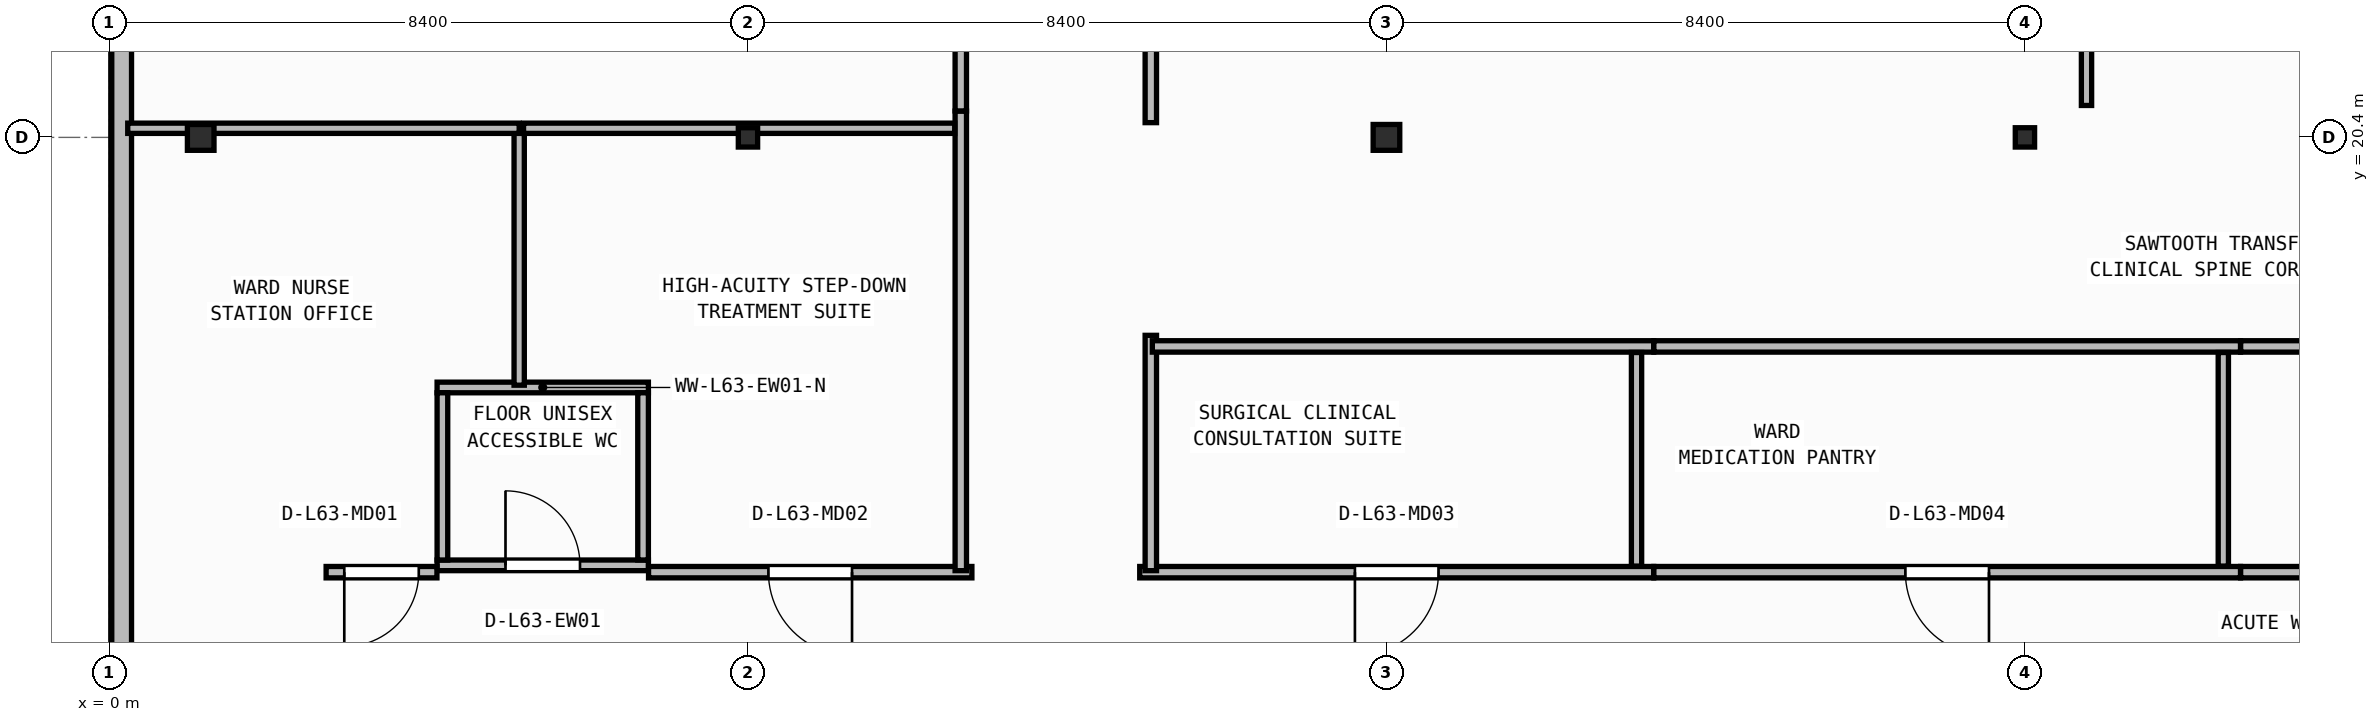
"""IFC4 building model, lengths in metres.
Left out: names, types, materials, properties, quantities, classifications, styles, units other than length and angle.
Written with IfcOpenShell. Run it as: python <this file> out.ifc"""

import sys

from ifc_helpers import new_model, si_unit, direction, frame, frame_2d, origin, origin_2d, place, context, subcontext, project, spatial, rectangle, i_section, extrude, element, fill, save


model = new_model("IFC4")
c1 = context("Model", 3, precision=1e-05, world=origin(), true_north=direction((0.0, 1.0)))
c2 = subcontext(c1, "Body", "Model", "MODEL_VIEW")
j1 = project(units=[si_unit("LENGTHUNIT", "METRE"), si_unit("PLANEANGLEUNIT", "RADIAN")], contexts=[c1])
p1 = place(None, origin())
s1 = spatial("IfcSite", under=j1, at=p1, CompositionType="ELEMENT")
p2 = place(p1, origin())
s2 = spatial("IfcBuilding", under=s1, at=p2, CompositionType="ELEMENT")
p3 = place(p2, frame((0.0, 0.0, 256.55)))
s3 = spatial("IfcBuildingStorey", under=s2, at=p3, CompositionType="ELEMENT", Elevation=256.55)
p4 = place(p3, frame((1.2, 20.4, 0.0), z_axis=(0.0, 0.0, 1.0), x_axis=(1.0, 0.0, 0.0)))
e1 = element("IfcColumn", 1, at=p4, inside=s3, PredefinedType="COLUMN", context=c2, shape_type="SweptSolid", body=[
    extrude(i_section(OverallWidth=0.35, OverallDepth=0.34, WebThickness=0.016, FlangeThickness=0.028, at=origin_2d()), origin(), (0.0, 0.0, 1.0), 3.95),
])
p5 = place(p3, frame((8.4, 20.4, 0.0), z_axis=(0.0, 0.0, 1.0), x_axis=(1.0, 0.0, 0.0)))
e2 = element("IfcColumn", 2, at=p5, inside=s3, PredefinedType="COLUMN", context=c2, shape_type="SweptSolid", body=[
    extrude(i_section(OverallWidth=0.254, OverallDepth=0.254, WebThickness=0.009, FlangeThickness=0.014, FilletRadius=0.013, at=origin_2d()), origin(), (0.0, 0.0, 1.0), 3.95),
])
p6 = place(p3, frame((16.8, 20.4, 0.0), z_axis=(0.0, 0.0, 1.0), x_axis=(1.0, 0.0, 0.0)))
e3 = element("IfcColumn", 3, at=p6, inside=s3, PredefinedType="COLUMN", context=c2, shape_type="SweptSolid", body=[
    extrude(i_section(OverallWidth=0.35, OverallDepth=0.34, WebThickness=0.016, FlangeThickness=0.028, at=origin_2d()), origin(), (0.0, 0.0, 1.0), 3.95),
])
p7 = place(p3, frame((25.2, 20.4, 0.0), z_axis=(0.0, 0.0, 1.0), x_axis=(1.0, 0.0, 0.0)))
e4 = element("IfcColumn", 4, at=p7, inside=s3, PredefinedType="COLUMN", context=c2, shape_type="SweptSolid", body=[
    extrude(i_section(OverallWidth=0.254, OverallDepth=0.254, WebThickness=0.009, FlangeThickness=0.014, FilletRadius=0.013, at=origin_2d()), origin(), (0.0, 0.0, 1.0), 3.95),
])
p8 = place(p3, frame((0.16, 39.04, 0.0), z_axis=(0.0, 0.0, 1.0), x_axis=(0.0, -1.0, 0.0)))
e5 = element("IfcWall", 5, at=p8, inside=s3, PredefinedType="STANDARD", context=c2, shape_type="SweptSolid", body=[
    extrude(rectangle(XDim=36.48, YDim=0.26, at=frame_2d((18.24, 0.0))), origin(), (0.0, 0.0, 1.0), 3.71),
])
p9 = place(p8, frame((26.31, 0.0, 0.9)))
e6 = element("IfcOpeningElement", 6, at=p9, cuts=e5, PredefinedType="OPENING", context=c2, shape_type="SweptSolid", body=[
    extrude(rectangle(XDim=2.4, YDim=1.65, at=frame_2d((1.2, 0.825))), frame((0.0, 0.14, 0.0), z_axis=(0.0, -1.0, 0.0), x_axis=(1.0, 0.0, 0.0)), (0.0, 0.0, 1.0), 0.28),
])
p10 = place(p3, frame((4.31, 14.77, 0.0), z_axis=(0.0, 0.0, 1.0), x_axis=(1.0, 0.0, 0.0)))
e7 = element("IfcWall", 7, at=p10, inside=s3, PredefinedType="PARTITIONING", context=c2, shape_type="SweptSolid", body=[
    extrude(rectangle(XDim=2.78, YDim=0.14, at=frame_2d((1.39, 0.0))), origin(), (0.0, 0.0, 1.0), 3.71),
])
p11 = place(p10, frame((0.9, 0.0, 0.0)))
e8 = element("IfcOpeningElement", 8, at=p11, cuts=e7, PredefinedType="OPENING", context=c2, shape_type="SweptSolid", body=[
    extrude(rectangle(XDim=0.98, YDim=2.1, at=frame_2d((0.49, 1.05))), frame((0.0, 0.08, 0.0), z_axis=(0.0, -1.0, 0.0), x_axis=(1.0, 0.0, 0.0)), (0.0, 0.0, 1.0), 0.16),
])
p12 = place(p3, frame((4.31, 17.11, 0.0), z_axis=(0.0, 0.0, 1.0), x_axis=(1.0, 0.0, 0.0)))
e9 = element("IfcWall", 9, at=p12, inside=s3, PredefinedType="PARTITIONING", context=c2, shape_type="SweptSolid", body=[
    extrude(rectangle(XDim=2.78, YDim=0.14, at=frame_2d((1.39, 0.0))), origin(), (0.0, 0.0, 1.0), 3.71),
])
for number, where, z_axis, x_axis in (
    (10, (4.38, 14.84, 0.0), (0.0, 0.0, 1.0), (0.0, 1.0, 0.0)),
    (11, (7.02, 14.84, 0.0), (0.0, 0.0, 1.0), (0.0, 1.0, 0.0)),
):
    element("IfcWall", number, at=place(p3, frame(where, z_axis=z_axis, x_axis=x_axis)), inside=s3, PredefinedType="PARTITIONING", context=c2, shape_type="SweptSolid", body=[
        extrude(rectangle(XDim=2.2, YDim=0.14, at=frame_2d((1.1, 0.0))), origin(), (0.0, 0.0, 1.0), 3.71),
    ])
p13 = place(p3, frame((4.308, 14.68, 0.0), z_axis=(0.0, 0.0, 1.0), x_axis=(-1.0, 0.0, 0.0)))
e12 = element("IfcWall", 12, at=p13, inside=s3, PredefinedType="PARTITIONING", context=c2, shape_type="SweptSolid", body=[
    extrude(rectangle(XDim=1.458, YDim=0.15, at=frame_2d((0.729, 0.0))), origin(), (0.0, 0.0, 1.0), 3.71),
])
p14 = place(p13, frame((0.239, 0.0, 0.0)))
e13 = element("IfcOpeningElement", 13, at=p14, cuts=e12, PredefinedType="OPENING", context=c2, shape_type="SweptSolid", body=[
    extrude(rectangle(XDim=0.98, YDim=2.1, at=frame_2d((0.49, 1.05))), frame((0.0, 0.085, 0.0), z_axis=(0.0, -1.0, 0.0), x_axis=(1.0, 0.0, 0.0)), (0.0, 0.0, 1.0), 0.17),
])
p15 = place(p3, frame((11.346, 14.68, 0.0), z_axis=(0.0, 0.0, 1.0), x_axis=(-1.0, 0.0, 0.0)))
e14 = element("IfcWall", 14, at=p15, inside=s3, PredefinedType="PARTITIONING", context=c2, shape_type="SweptSolid", body=[
    extrude(rectangle(XDim=4.254, YDim=0.15, at=frame_2d((2.127, 0.0))), origin(), (0.0, 0.0, 1.0), 3.71),
])
p16 = place(p15, frame((1.577, 0.0, 0.0)))
e15 = element("IfcOpeningElement", 15, at=p16, cuts=e14, PredefinedType="OPENING", context=c2, shape_type="SweptSolid", body=[
    extrude(rectangle(XDim=1.1, YDim=2.1, at=frame_2d((0.55, 1.05))), frame((0.0, 0.085, 0.0), z_axis=(0.0, -1.0, 0.0), x_axis=(1.0, 0.0, 0.0)), (0.0, 0.0, 1.0), 0.17),
])
p17 = place(p3, frame((20.316, 14.68, 0.0), z_axis=(0.0, 0.0, 1.0), x_axis=(-1.0, 0.0, 0.0)))
e16 = element("IfcWall", 16, at=p17, inside=s3, PredefinedType="PARTITIONING", context=c2, shape_type="SweptSolid", body=[
    extrude(rectangle(XDim=6.762, YDim=0.15, at=frame_2d((3.381, 0.0))), origin(), (0.0, 0.0, 1.0), 3.71),
])
p18 = place(p17, frame((2.831, 0.0, 0.0)))
e17 = element("IfcOpeningElement", 17, at=p18, cuts=e16, PredefinedType="OPENING", context=c2, shape_type="SweptSolid", body=[
    extrude(rectangle(XDim=1.1, YDim=2.1, at=frame_2d((0.55, 1.05))), frame((0.0, 0.085, 0.0), z_axis=(0.0, -1.0, 0.0), x_axis=(1.0, 0.0, 0.0)), (0.0, 0.0, 1.0), 0.17),
])
p19 = place(p3, frame((28.036, 14.68, 0.0), z_axis=(0.0, 0.0, 1.0), x_axis=(-1.0, 0.0, 0.0)))
e18 = element("IfcWall", 18, at=p19, inside=s3, PredefinedType="PARTITIONING", context=c2, shape_type="SweptSolid", body=[
    extrude(rectangle(XDim=7.718, YDim=0.15, at=frame_2d((3.859, 0.0))), origin(), (0.0, 0.0, 1.0), 3.71),
])
p20 = place(p19, frame((3.309, 0.0, 0.0)))
e19 = element("IfcOpeningElement", 19, at=p20, cuts=e18, PredefinedType="OPENING", context=c2, shape_type="SweptSolid", body=[
    extrude(rectangle(XDim=1.1, YDim=2.1, at=frame_2d((0.55, 1.05))), frame((0.0, 0.085, 0.0), z_axis=(0.0, -1.0, 0.0), x_axis=(1.0, 0.0, 0.0)), (0.0, 0.0, 1.0), 0.17),
])
p21 = place(p3, frame((37.956, 14.68, 0.0), z_axis=(0.0, 0.0, 1.0), x_axis=(-1.0, 0.0, 0.0)))
e20 = element("IfcWall", 20, at=p21, inside=s3, PredefinedType="PARTITIONING", context=c2, shape_type="SweptSolid", body=[
    extrude(rectangle(XDim=9.918, YDim=0.15, at=frame_2d((4.959, 0.0))), origin(), (0.0, 0.0, 1.0), 3.71),
])
p22 = place(p21, frame((4.409, 0.0, 0.0)))
e21 = element("IfcOpeningElement", 21, at=p22, cuts=e20, PredefinedType="OPENING", context=c2, shape_type="SweptSolid", body=[
    extrude(rectangle(XDim=1.1, YDim=2.1, at=frame_2d((0.55, 1.05))), frame((0.0, 0.085, 0.0), z_axis=(0.0, -1.0, 0.0), x_axis=(1.0, 0.0, 0.0)), (0.0, 0.0, 1.0), 0.17),
])
p23 = place(p3, frame((11.2, 20.746, 0.0), z_axis=(0.0, 0.0, 1.0), x_axis=(0.0, -1.0, 0.0)))
e22 = element("IfcWall", 22, at=p23, inside=s3, PredefinedType="PARTITIONING", context=c2, shape_type="SweptSolid", body=[
    extrude(rectangle(XDim=6.046, YDim=0.15, at=frame_2d((3.023, 0.0))), origin(), (0.0, 0.0, 1.0), 3.71),
])
p24 = place(p3, frame((13.7, 14.7, 0.0), z_axis=(0.0, 0.0, 1.0), x_axis=(0.0, 1.0, 0.0)))
e23 = element("IfcWall", 23, at=p24, inside=s3, PredefinedType="PARTITIONING", context=c2, shape_type="SweptSolid", body=[
    extrude(rectangle(XDim=3.096, YDim=0.15, at=frame_2d((1.548, 0.0))), origin(), (0.0, 0.0, 1.0), 3.71),
])
p25 = place(p3, frame((11.2, 28.56, 0.0), z_axis=(0.0, 0.0, 1.0), x_axis=(0.0, -1.0, 0.0)))
e24 = element("IfcWall", 24, at=p25, inside=s3, PredefinedType="PARTITIONING", context=c2, shape_type="SweptSolid", body=[
    extrude(rectangle(XDim=7.812, YDim=0.15, at=frame_2d((3.906, 0.0))), origin(), (0.0, 0.0, 1.0), 3.71),
])
p26 = place(p25, frame((3.356, 0.0, 0.0)))
e25 = element("IfcOpeningElement", 25, at=p26, cuts=e24, PredefinedType="OPENING", context=c2, shape_type="SweptSolid", body=[
    extrude(rectangle(XDim=1.1, YDim=2.1, at=frame_2d((0.55, 1.05))), frame((0.0, 0.085, 0.0), z_axis=(0.0, -1.0, 0.0), x_axis=(1.0, 0.0, 0.0)), (0.0, 0.0, 1.0), 0.17),
])
p27 = place(p3, frame((13.7, 20.594, 0.0), z_axis=(0.0, 0.0, 1.0), x_axis=(0.0, 1.0, 0.0)))
e26 = element("IfcWall", 26, at=p27, inside=s3, PredefinedType="PARTITIONING", context=c2, shape_type="SweptSolid", body=[
    extrude(rectangle(XDim=7.966, YDim=0.15, at=frame_2d((3.983, 0.0))), origin(), (0.0, 0.0, 1.0), 3.71),
])
p28 = place(p27, frame((3.433, 0.0, 0.0)))
e27 = element("IfcOpeningElement", 27, at=p28, cuts=e26, PredefinedType="OPENING", context=c2, shape_type="SweptSolid", body=[
    extrude(rectangle(XDim=1.1, YDim=2.1, at=frame_2d((0.55, 1.05))), frame((0.0, 0.085, 0.0), z_axis=(0.0, -1.0, 0.0), x_axis=(1.0, 0.0, 0.0)), (0.0, 0.0, 1.0), 0.17),
])
p29 = place(p3, frame((13.72, 17.65, 0.0), z_axis=(0.0, 0.0, 1.0), x_axis=(1.0, 0.0, 0.0)))
e28 = element("IfcWall", 28, at=p29, inside=s3, PredefinedType="PARTITIONING", context=c2, shape_type="SweptSolid", body=[
    extrude(rectangle(XDim=6.596, YDim=0.15, at=frame_2d((3.298, 0.0))), origin(), (0.0, 0.0, 1.0), 3.71),
])
p30 = place(p3, frame((20.318, 17.65, 0.0), z_axis=(0.0, 0.0, 1.0), x_axis=(1.0, 0.0, 0.0)))
e29 = element("IfcWall", 29, at=p30, inside=s3, PredefinedType="PARTITIONING", context=c2, shape_type="SweptSolid", body=[
    extrude(rectangle(XDim=7.718, YDim=0.15, at=frame_2d((3.859, 0.0))), origin(), (0.0, 0.0, 1.0), 3.71),
])
p31 = place(p3, frame((28.038, 17.65, 0.0), z_axis=(0.0, 0.0, 1.0), x_axis=(1.0, 0.0, 0.0)))
e30 = element("IfcWall", 30, at=p31, inside=s3, PredefinedType="PARTITIONING", context=c2, shape_type="SweptSolid", body=[
    extrude(rectangle(XDim=9.918, YDim=0.15, at=frame_2d((4.959, 0.0))), origin(), (0.0, 0.0, 1.0), 3.71),
])
p32 = place(p3, frame((5.39, 17.14, 0.0), z_axis=(0.0, 0.0, 1.0), x_axis=(0.0, 1.0, 0.0)))
e31 = element("IfcWall", 31, at=p32, inside=s3, PredefinedType="PARTITIONING", context=c2, shape_type="SweptSolid", body=[
    extrude(rectangle(XDim=3.38, YDim=0.135, at=frame_2d((1.69, 0.0))), origin(), (0.0, 0.0, 1.0), 3.71),
])
p33 = place(p3, frame((5.39, 20.52, 0.0), z_axis=(0.0, 0.0, 1.0), x_axis=(-1.0, 0.0, 0.0)))
e32 = element("IfcWall", 32, at=p33, inside=s3, PredefinedType="PARTITIONING", context=c2, shape_type="SweptSolid", body=[
    extrude(rectangle(XDim=5.15, YDim=0.135, at=frame_2d((2.575, 0.0))), origin(), (0.0, 0.0, 1.0), 3.157),
])
p34 = place(p3, frame((11.12, 20.52, 0.0), z_axis=(0.0, 0.0, 1.0), x_axis=(-1.0, 0.0, 0.0)))
e33 = element("IfcWall", 33, at=p34, inside=s3, PredefinedType="PARTITIONING", context=c2, shape_type="SweptSolid", body=[
    extrude(rectangle(XDim=5.673, YDim=0.135, at=frame_2d((2.836, 0.0))), origin(), (0.0, 0.0, 1.0), 3.157),
])
for number, where, z_axis, x_axis in (
    (34, (20.09, 14.76, 0.0), (0.0, 0.0, 1.0), (0.0, 1.0, 0.0)),
    (35, (27.81, 14.76, 0.0), (0.0, 0.0, 1.0), (0.0, 1.0, 0.0)),
):
    element("IfcWall", number, at=place(p3, frame(where, z_axis=z_axis, x_axis=x_axis)), inside=s3, PredefinedType="PARTITIONING", context=c2, shape_type="SweptSolid", body=[
        extrude(rectangle(XDim=2.81, YDim=0.135, at=frame_2d((1.405, 0.0))), origin(), (0.0, 0.0, 1.0), 3.71),
    ])
p35 = place(p3, frame((26.01, 20.82, 0.0), z_axis=(0.0, 0.0, 1.0), x_axis=(0.0, 1.0, 0.0)))
e36 = element("IfcWall", 36, at=p35, inside=s3, PredefinedType="PARTITIONING", context=c2, shape_type="SweptSolid", body=[
    extrude(rectangle(XDim=7.58, YDim=0.135, at=frame_2d((3.79, 0.0))), origin(), (0.0, 0.0, 1.0), 3.71),
])
p36 = place(p35, frame((3.24, 0.0, 0.0)))
e37 = element("IfcOpeningElement", 37, at=p36, cuts=e36, PredefinedType="OPENING", context=c2, shape_type="SweptSolid", body=[
    extrude(rectangle(XDim=1.1, YDim=2.1, at=frame_2d((0.55, 1.05))), frame((0.0, 0.077, 0.0), z_axis=(0.0, -1.0, 0.0), x_axis=(1.0, 0.0, 0.0)), (0.0, 0.0, 1.0), 0.155),
])
p37 = place(p11, origin())
e38 = element("IfcDoor", 38, at=p37, inside=s3, OperationType="SINGLE_SWING_LEFT", PredefinedType="DOOR", context=c2, shape_type="SweptSolid", body=[
    extrude(rectangle(XDim=0.98, YDim=2.1, at=frame_2d((0.49, 1.05))), frame((0.0, 0.025, 0.0), z_axis=(0.0, -1.0, 0.0), x_axis=(1.0, 0.0, 0.0)), (0.0, 0.0, 1.0), 0.05),
])
fill(e8, e38)
p38 = place(p14, origin())
e39 = element("IfcDoor", 39, at=p38, inside=s3, OperationType="SINGLE_SWING_RIGHT", PredefinedType="DOOR", context=c2, shape_type="SweptSolid", body=[
    extrude(rectangle(XDim=0.98, YDim=2.1, at=frame_2d((0.49, 1.05))), frame((0.0, 0.025, 0.0), z_axis=(0.0, -1.0, 0.0), x_axis=(1.0, 0.0, 0.0)), (0.0, 0.0, 1.0), 0.05),
])
fill(e13, e39)
p39 = place(p16, origin())
e40 = element("IfcDoor", 40, at=p39, inside=s3, OperationType="SINGLE_SWING_LEFT", PredefinedType="DOOR", context=c2, shape_type="SweptSolid", body=[
    extrude(rectangle(XDim=1.1, YDim=2.1, at=frame_2d((0.55, 1.05))), frame((0.0, 0.025, 0.0), z_axis=(0.0, -1.0, 0.0), x_axis=(1.0, 0.0, 0.0)), (0.0, 0.0, 1.0), 0.05),
])
fill(e15, e40)
p40 = place(p18, origin())
e41 = element("IfcDoor", 41, at=p40, inside=s3, OperationType="SINGLE_SWING_RIGHT", PredefinedType="DOOR", context=c2, shape_type="SweptSolid", body=[
    extrude(rectangle(XDim=1.1, YDim=2.1, at=frame_2d((0.55, 1.05))), frame((0.0, 0.025, 0.0), z_axis=(0.0, -1.0, 0.0), x_axis=(1.0, 0.0, 0.0)), (0.0, 0.0, 1.0), 0.05),
])
fill(e17, e41)
p41 = place(p20, origin())
e42 = element("IfcDoor", 42, at=p41, inside=s3, OperationType="SINGLE_SWING_LEFT", PredefinedType="DOOR", context=c2, shape_type="SweptSolid", body=[
    extrude(rectangle(XDim=1.1, YDim=2.1, at=frame_2d((0.55, 1.05))), frame((0.0, 0.025, 0.0), z_axis=(0.0, -1.0, 0.0), x_axis=(1.0, 0.0, 0.0)), (0.0, 0.0, 1.0), 0.05),
])
fill(e19, e42)
save(model, sys.argv[1])
